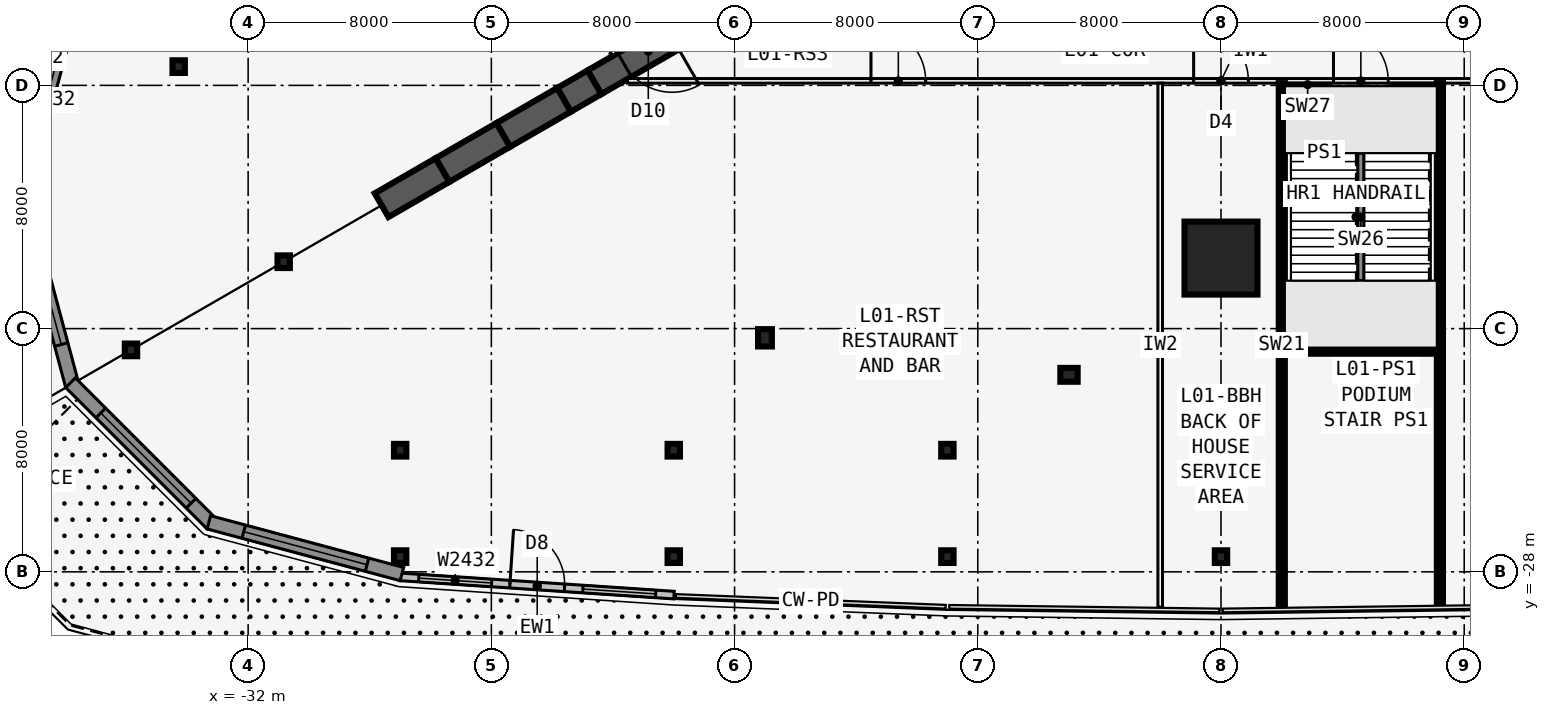
"""IFC4 building model, lengths in metres.
Left out: names, types, materials, properties, quantities, classifications, styles, units other than length and angle.
Written with IfcOpenShell. Run it as: python <this file> out.ifc"""

import sys

from ifc_helpers import new_model, si_unit, direction, frame, frame_2d, origin, origin_2d, place, context, subcontext, project, spatial, rectangle, i_section, extrude, element, fill, save


model = new_model("IFC4")
c1 = context("Model", 3, precision=1e-05, world=origin(), true_north=direction((0.0, 1.0)))
c2 = subcontext(c1, "Body", "Model", "MODEL_VIEW")
j1 = project(units=[si_unit("LENGTHUNIT", "METRE"), si_unit("PLANEANGLEUNIT", "RADIAN")], contexts=[c1])
p1 = place(None, origin())
s1 = spatial("IfcSite", under=j1, at=p1, CompositionType="ELEMENT")
p2 = place(p1, origin())
s2 = spatial("IfcBuilding", under=s1, at=p2, CompositionType="ELEMENT")
p3 = place(p2, frame((0.0, 0.0, 6.0)))
s3 = spatial("IfcBuildingStorey", under=s2, at=p3, CompositionType="ELEMENT", Elevation=6.0)
p4 = place(p3, frame((-16.5, -9.526, 0.0), z_axis=(0.0, 0.0, 1.0), x_axis=(-0.866031398331, -0.499989616998, 0.0)))
e1 = element("IfcWall", 1, at=p4, inside=s3, PredefinedType="SHEAR", context=c2, shape_type="SweptSolid", body=[
    extrude(rectangle(XDim=4.746, YDim=0.9, at=frame_2d((2.373, 0.0))), origin(), (0.0, 0.0, 1.0), 5.0),
])
p5 = place(p4, frame((1.8, 0.0, 0.0)))
e2 = element("IfcOpeningElement", 2, at=p5, cuts=e1, PredefinedType="OPENING", context=c2, shape_type="SweptSolid", body=[
    extrude(rectangle(XDim=1.8, YDim=2.13, at=frame_2d((0.9, 1.065))), frame((0.0, 0.46, 0.0), z_axis=(0.0, -1.0, 0.0), x_axis=(1.0, 0.0, 0.0)), (0.0, 0.0, 1.0), 0.92),
])
p6 = place(p3, frame((-20.61, -11.899, 0.0), z_axis=(0.0, 0.0, 1.0), x_axis=(-0.866009537788, -0.500027479704, 0.0)))
e3 = element("IfcWall", 3, at=p6, inside=s3, PredefinedType="SHEAR", context=c2, shape_type="SweptSolid", body=[
    extrude(rectangle(XDim=1.155, YDim=0.9, at=frame_2d((0.577, 0.0))), origin(), (0.0, 0.0, 1.0), 5.0),
])
for number, where, z_axis, x_axis in (
    (4, (-21.61, -12.477, 0.0), (0.0, 0.0, 1.0), (-0.866, -0.5, 0.0)),
    (5, (-23.61, -13.631, 0.0), (0.0, 0.0, 1.0), (-0.866, -0.5, 0.0)),
    (6, (-25.61, -14.786, 0.0), (0.0, 0.0, 1.0), (-0.866, -0.5, 0.0)),
):
    element("IfcWall", number, at=place(p3, frame(where, z_axis=z_axis, x_axis=x_axis)), inside=s3, PredefinedType="SHEAR", context=c2, shape_type="SweptSolid", body=[
        extrude(rectangle(XDim=2.309, YDim=0.9, at=frame_2d((1.155, 0.0))), origin(), (0.0, 0.0, 1.0), 5.0),
    ])
for number, where, z_axis, x_axis in (
    (7, (-15.0, -20.303, 0.0), (0.0, 0.0, 1.0), (1.0, 0.0, 0.0)),
    (8, (-5.0, -21.521, 0.0), (0.0, 0.0, 1.0), (0.0, -1.0, 0.0)),
    (9, (5.0, -21.521, 0.0), (0.0, 0.0, 1.0), (0.0, -1.0, 0.0)),
):
    element("IfcColumn", number, at=place(p3, frame(where, z_axis=z_axis, x_axis=x_axis)), inside=s3, PredefinedType="COLUMN", context=c2, shape_type="SweptSolid", body=[
        extrude(i_section(OverallWidth=0.455, OverallDepth=0.569, WebThickness=0.078, FlangeThickness=0.125, at=origin_2d()), origin(), (0.0, 0.0, 1.0), 5.0),
    ])
for number, where, z_axis, x_axis in (
    (10, (-30.831, -17.8, 0.0), (0.0, 0.0, 1.0), (1.0, 0.0, 0.0)),
    (11, (-35.854, -20.7, 0.0), (0.0, 0.0, 1.0), (1.0, 0.0, 0.0)),
    (12, (-18.0, -24.0, 0.0), (0.0, 0.0, 1.0), (1.0, 0.0, 0.0)),
    (13, (-27.0, -24.0, 0.0), (0.0, 0.0, 1.0), (1.0, 0.0, 0.0)),
    (14, (-9.0, -24.0, 0.0), (0.0, 0.0, 1.0), (1.0, 0.0, 0.0)),
    (15, (0.0, -24.0, 0.0), (0.0, 0.0, 1.0), (1.0, 0.0, 0.0)),
    (16, (-34.285, -11.383, 0.0), (0.0, 0.0, 1.0), (1.0, 0.0, 0.0)),
    (17, (-18.0, -27.5, 0.0), (0.0, 0.0, 1.0), (1.0, 0.0, 0.0)),
    (18, (-27.0, -27.5, 0.0), (0.0, 0.0, 1.0), (1.0, 0.0, 0.0)),
    (19, (-9.0, -27.5, 0.0), (0.0, 0.0, 1.0), (1.0, 0.0, 0.0)),
    (20, (0.0, -27.5, 0.0), (0.0, 0.0, 1.0), (1.0, 0.0, 0.0)),
):
    element("IfcColumn", number, at=place(p3, frame(where, z_axis=z_axis, x_axis=x_axis)), inside=s3, PredefinedType="COLUMN", context=c2, shape_type="SweptSolid", body=[
        extrude(i_section(OverallWidth=0.406, OverallDepth=0.417, WebThickness=0.03, FlangeThickness=0.048, at=origin_2d()), origin(), (0.0, 0.0, 1.0), 5.0),
    ])
p7 = place(p3, frame((0.0, -17.68, 0.0), z_axis=(0.0, 0.0, 1.0), x_axis=(0.0, -1.0, 0.0)))
e21 = element("IfcColumn", 21, at=p7, inside=s3, PredefinedType="COLUMN", context=c2, shape_type="SweptSolid", body=[
    extrude(rectangle(XDim=2.4, YDim=2.4, at=origin_2d()), origin(), (0.0, 0.0, 1.0), 5.0),
])
p8 = place(p3, frame((-26.992, -28.166, 0.0), z_axis=(0.0, 0.0, 1.0), x_axis=(0.997786235602, -0.066502842363, 0.0)))
e22 = element("IfcWall", 22, at=p8, inside=s3, PredefinedType="STANDARD", context=c2, shape_type="SweptSolid", body=[
    extrude(rectangle(XDim=9.02, YDim=0.25, at=frame_2d((4.51, 0.0))), origin(), (0.0, 0.0, 1.0), 4.75),
])
p9 = place(p8, frame((3.61, 0.0, 0.0)))
e23 = element("IfcOpeningElement", 23, at=p9, cuts=e22, PredefinedType="OPENING", context=c2, shape_type="SweptSolid", body=[
    extrude(rectangle(XDim=1.8, YDim=2.4, at=frame_2d((0.9, 1.2))), frame((0.0, 0.135, 0.0), z_axis=(0.0, -1.0, 0.0), x_axis=(1.0, 0.0, 0.0)), (0.0, 0.0, 1.0), 0.27),
])
p10 = place(p8, frame((0.605, 0.0, 0.6)))
e24 = element("IfcOpeningElement", 24, at=p10, cuts=e22, PredefinedType="OPENING", context=c2, shape_type="SweptSolid", body=[
    extrude(rectangle(XDim=2.4, YDim=3.2, at=frame_2d((1.2, 1.6))), frame((0.0, 0.135, 0.0), z_axis=(0.0, -1.0, 0.0), x_axis=(1.0, 0.0, 0.0)), (0.0, 0.0, 1.0), 0.27),
])
p11 = place(p8, frame((6.015, 0.0, 0.6)))
e25 = element("IfcOpeningElement", 25, at=p11, cuts=e22, PredefinedType="OPENING", context=c2, shape_type="SweptSolid", body=[
    extrude(rectangle(XDim=2.4, YDim=3.2, at=frame_2d((1.2, 1.6))), frame((0.0, 0.135, 0.0), z_axis=(0.0, -1.0, 0.0), x_axis=(1.0, 0.0, 0.0)), (0.0, 0.0, 1.0), 0.27),
])
p12 = place(p3, frame((-37.783, -9.296, 0.0), z_axis=(0.0, 0.0, 1.0), x_axis=(-0.258813420722, -0.96592733332, 0.0)))
e26 = element("IfcWall", 26, at=p12, inside=s3, PredefinedType="SOLIDWALL", context=c2, shape_type="SweptSolid", body=[
    extrude(rectangle(XDim=6.575, YDim=0.45, at=frame_2d((3.288, 0.0))), origin(), (0.0, 0.0, 1.0), 4.75),
])
p13 = place(p12, frame((1.188, 0.0, 0.6)))
e27 = element("IfcOpeningElement", 27, at=p13, cuts=e26, PredefinedType="OPENING", context=c2, shape_type="SweptSolid", body=[
    extrude(rectangle(XDim=4.2, YDim=3.2, at=frame_2d((2.1, 1.6))), frame((0.0, 0.235, 0.0), z_axis=(0.0, -1.0, 0.0), x_axis=(1.0, 0.0, 0.0)), (0.0, 0.0, 1.0), 0.47),
])
p14 = place(p3, frame((-39.484, -15.53, 0.0), z_axis=(0.0, 0.0, 1.0), x_axis=(0.258813420722, -0.96592733332, 0.0)))
e28 = element("IfcWall", 28, at=p14, inside=s3, PredefinedType="SOLIDWALL", context=c2, shape_type="SweptSolid", body=[
    extrude(rectangle(XDim=6.575, YDim=0.45, at=frame_2d((3.288, 0.0))), origin(), (0.0, 0.0, 1.0), 4.75),
])
p15 = place(p14, frame((0.969, 0.0, 0.6)))
e29 = element("IfcOpeningElement", 29, at=p15, cuts=e28, PredefinedType="OPENING", context=c2, shape_type="SweptSolid", body=[
    extrude(rectangle(XDim=4.2, YDim=3.2, at=frame_2d((2.1, 1.6))), frame((0.0, 0.235, 0.0), z_axis=(0.0, -1.0, 0.0), x_axis=(1.0, 0.0, 0.0)), (0.0, 0.0, 1.0), 0.47),
])
p16 = place(p3, frame((-37.841, -21.78, 0.0), z_axis=(0.0, 0.0, 1.0), x_axis=(0.7070882144, -0.707125347486, 0.0)))
e30 = element("IfcWall", 30, at=p16, inside=s3, PredefinedType="SOLIDWALL", context=c2, shape_type="SweptSolid", body=[
    extrude(rectangle(XDim=6.575, YDim=0.45, at=frame_2d((3.287, 0.0))), origin(), (0.0, 0.0, 1.0), 4.75),
])
p17 = place(p16, frame((1.406, 0.0, 0.6)))
e31 = element("IfcOpeningElement", 31, at=p17, cuts=e30, PredefinedType="OPENING", context=c2, shape_type="SweptSolid", body=[
    extrude(rectangle(XDim=4.2, YDim=3.2, at=frame_2d((2.1, 1.6))), frame((0.0, 0.235, 0.0), z_axis=(0.0, -1.0, 0.0), x_axis=(1.0, 0.0, 0.0)), (0.0, 0.0, 1.0), 0.47),
])
p18 = place(p3, frame((-33.293, -26.371, 0.0), z_axis=(0.0, 0.0, 1.0), x_axis=(0.965918049854, -0.258848065411, 0.0)))
e32 = element("IfcWall", 32, at=p18, inside=s3, PredefinedType="SOLIDWALL", context=c2, shape_type="SweptSolid", body=[
    extrude(rectangle(XDim=6.575, YDim=0.45, at=frame_2d((3.288, 0.0))), origin(), (0.0, 0.0, 1.0), 4.75),
])
p19 = place(p18, frame((1.188, 0.0, 0.6)))
e33 = element("IfcOpeningElement", 33, at=p19, cuts=e32, PredefinedType="OPENING", context=c2, shape_type="SweptSolid", body=[
    extrude(rectangle(XDim=4.2, YDim=3.2, at=frame_2d((2.1, 1.6))), frame((0.0, 0.235, 0.0), z_axis=(0.0, -1.0, 0.0), x_axis=(1.0, 0.0, 0.0)), (0.0, 0.0, 1.0), 0.47),
])
p20 = place(p3, frame((-42.859, -11.023, 0.0), z_axis=(0.0, 0.0, 1.0), x_axis=(0.444351186514, 0.895852679319, 0.0)))
e34 = element("IfcWall", 34, at=p20, inside=s3, PredefinedType="PARAPET", context=c2, shape_type="SweptSolid", body=[
    extrude(rectangle(XDim=13.009, YDim=0.3, at=frame_2d((6.504, 0.0))), origin(), (0.0, 0.0, 1.0), 1.1),
])
p21 = place(p3, frame((-19.527, -11.851, 0.0), z_axis=(0.0, 0.0, 1.0), x_axis=(1.0, 0.0, 0.0)))
e35 = element("IfcWall", 35, at=p21, inside=s3, PredefinedType="PARTITIONING", context=c2, shape_type="SweptSolid", body=[
    extrude(rectangle(XDim=39.054, YDim=0.15, at=frame_2d((19.527, 0.0))), origin(), (0.0, 0.0, 1.0), 3.808),
])
p22 = place(p21, frame((8.013, 0.0, 0.0)))
e36 = element("IfcOpeningElement", 36, at=p22, cuts=e35, PredefinedType="OPENING", context=c2, shape_type="SweptSolid", body=[
    extrude(rectangle(XDim=1.8, YDim=2.13, at=frame_2d((0.9, 1.065))), frame((0.0, 0.085, 0.0), z_axis=(0.0, -1.0, 0.0), x_axis=(1.0, 0.0, 0.0)), (0.0, 0.0, 1.0), 0.17),
])
p23 = place(p21, frame((18.627, 0.0, 0.0)))
e37 = element("IfcOpeningElement", 37, at=p23, cuts=e35, PredefinedType="OPENING", context=c2, shape_type="SweptSolid", body=[
    extrude(rectangle(XDim=1.8, YDim=2.13, at=frame_2d((0.9, 1.065))), frame((0.0, 0.085, 0.0), z_axis=(0.0, -1.0, 0.0), x_axis=(1.0, 0.0, 0.0)), (0.0, 0.0, 1.0), 0.17),
])
p24 = place(p21, frame((23.227, 0.0, 0.0)))
e38 = element("IfcOpeningElement", 38, at=p24, cuts=e35, PredefinedType="OPENING", context=c2, shape_type="SweptSolid", body=[
    extrude(rectangle(XDim=1.8, YDim=2.13, at=frame_2d((0.9, 1.065))), frame((0.0, 0.085, 0.0), z_axis=(0.0, -1.0, 0.0), x_axis=(1.0, 0.0, 0.0)), (0.0, 0.0, 1.0), 0.17),
])
p25 = place(p21, frame((31.841, 0.0, 0.0)))
e39 = element("IfcOpeningElement", 39, at=p25, cuts=e35, PredefinedType="OPENING", context=c2, shape_type="SweptSolid", body=[
    extrude(rectangle(XDim=1.8, YDim=2.13, at=frame_2d((0.9, 1.065))), frame((0.0, 0.085, 0.0), z_axis=(0.0, -1.0, 0.0), x_axis=(1.0, 0.0, 0.0)), (0.0, 0.0, 1.0), 0.17),
])
p26 = place(p3, frame((-2.0, -11.926, 0.0), z_axis=(0.0, 0.0, 1.0), x_axis=(0.0, -1.0, 0.0)))
e40 = element("IfcWall", 40, at=p26, inside=s3, PredefinedType="PARTITIONING", context=c2, shape_type="SweptSolid", body=[
    extrude(rectangle(XDim=17.236, YDim=0.15, at=frame_2d((8.618, 0.0))), origin(), (0.0, 0.0, 1.0), 4.75),
])
p27 = place(p3, frame((2.0, -11.926, 0.0), z_axis=(0.0, 0.0, 1.0), x_axis=(0.0, -1.0, 0.0)))
e41 = element("IfcWall", 41, at=p27, inside=s3, PredefinedType="SHEAR", context=c2, shape_type="SweptSolid", body=[
    extrude(rectangle(XDim=17.236, YDim=0.2, at=frame_2d((8.618, 0.0))), origin(), (0.0, 0.0, 1.0), 5.0),
])
p28 = place(p3, frame((7.2, -11.926, 0.0), z_axis=(0.0, 0.0, 1.0), x_axis=(0.0, -1.0, 0.0)))
e42 = element("IfcWall", 42, at=p28, inside=s3, PredefinedType="SHEAR", context=c2, shape_type="SweptSolid", body=[
    extrude(rectangle(XDim=17.167, YDim=0.2, at=frame_2d((8.583, 0.0))), origin(), (0.0, 0.0, 1.0), 5.0),
])
p29 = place(p3, frame((20.027, -10.985, 0.0), z_axis=(0.0, 0.0, 1.0), x_axis=(-0.500001677587, 0.866024435227, 0.0)))
e43 = element("IfcWall", 43, at=p29, inside=s3, PredefinedType="PARTITIONING", context=c2, shape_type="SweptSolid", body=[
    extrude(rectangle(XDim=39.054, YDim=0.15, at=frame_2d((19.527, 0.0))), origin(), (0.0, 0.0, 1.0), 3.808),
])
p30 = place(p29, frame((10.013, 0.0, 0.0)))
e44 = element("IfcOpeningElement", 44, at=p30, cuts=e43, PredefinedType="OPENING", context=c2, shape_type="SweptSolid", body=[
    extrude(rectangle(XDim=1.8, YDim=2.13, at=frame_2d((0.9, 1.065))), frame((0.0, 0.085, 0.0), z_axis=(0.0, -1.0, 0.0), x_axis=(1.0, 0.0, 0.0)), (0.0, 0.0, 1.0), 0.17),
])
p31 = place(p29, frame((23.227, 0.0, 0.0)))
e45 = element("IfcOpeningElement", 45, at=p31, cuts=e43, PredefinedType="OPENING", context=c2, shape_type="SweptSolid", body=[
    extrude(rectangle(XDim=1.8, YDim=2.13, at=frame_2d((0.9, 1.065))), frame((0.0, 0.085, 0.0), z_axis=(0.0, -1.0, 0.0), x_axis=(1.0, 0.0, 0.0)), (0.0, 0.0, 1.0), 0.17),
])
p32 = place(p29, frame((27.627, 0.0, 0.0)))
e46 = element("IfcOpeningElement", 46, at=p32, cuts=e43, PredefinedType="OPENING", context=c2, shape_type="SweptSolid", body=[
    extrude(rectangle(XDim=1.0, YDim=2.13, at=frame_2d((0.5, 1.065))), frame((0.0, 0.085, 0.0), z_axis=(0.0, -1.0, 0.0), x_axis=(1.0, 0.0, 0.0)), (0.0, 0.0, 1.0), 0.17),
])
p33 = place(p29, frame((30.527, 0.0, 0.0)))
e47 = element("IfcOpeningElement", 47, at=p33, cuts=e43, PredefinedType="OPENING", context=c2, shape_type="SweptSolid", body=[
    extrude(rectangle(XDim=1.0, YDim=2.13, at=frame_2d((0.5, 1.065))), frame((0.0, 0.085, 0.0), z_axis=(0.0, -1.0, 0.0), x_axis=(1.0, 0.0, 0.0)), (0.0, 0.0, 1.0), 0.17),
])
p34 = place(p29, frame((33.277, 0.0, 0.0)))
e48 = element("IfcOpeningElement", 48, at=p34, cuts=e43, PredefinedType="OPENING", context=c2, shape_type="SweptSolid", body=[
    extrude(rectangle(XDim=1.0, YDim=2.13, at=frame_2d((0.5, 1.065))), frame((0.0, 0.085, 0.0), z_axis=(0.0, -1.0, 0.0), x_axis=(1.0, 0.0, 0.0)), (0.0, 0.0, 1.0), 0.17),
])
p35 = place(p29, frame((36.39, 0.0, 0.0)))
e49 = element("IfcOpeningElement", 49, at=p35, cuts=e43, PredefinedType="OPENING", context=c2, shape_type="SweptSolid", body=[
    extrude(rectangle(XDim=1.0, YDim=2.13, at=frame_2d((0.5, 1.065))), frame((0.0, 0.085, 0.0), z_axis=(0.0, -1.0, 0.0), x_axis=(1.0, 0.0, 0.0)), (0.0, 0.0, 1.0), 0.17),
])
p36 = place(p3, frame((-0.5, 22.836, 0.0), z_axis=(0.0, 0.0, 1.0), x_axis=(-0.500001677587, -0.866024435227, 0.0)))
e50 = element("IfcWall", 50, at=p36, inside=s3, PredefinedType="PARTITIONING", context=c2, shape_type="SweptSolid", body=[
    extrude(rectangle(XDim=39.054, YDim=0.15, at=frame_2d((19.527, 0.0))), origin(), (0.0, 0.0, 1.0), 3.808),
])
p37 = place(p36, frame((10.013, 0.0, 0.0)))
e51 = element("IfcOpeningElement", 51, at=p37, cuts=e50, PredefinedType="OPENING", context=c2, shape_type="SweptSolid", body=[
    extrude(rectangle(XDim=1.8, YDim=2.13, at=frame_2d((0.9, 1.065))), frame((0.0, 0.085, 0.0), z_axis=(0.0, -1.0, 0.0), x_axis=(1.0, 0.0, 0.0)), (0.0, 0.0, 1.0), 0.17),
])
p38 = place(p36, frame((23.227, 0.0, 0.0)))
e52 = element("IfcOpeningElement", 52, at=p38, cuts=e50, PredefinedType="OPENING", context=c2, shape_type="SweptSolid", body=[
    extrude(rectangle(XDim=1.8, YDim=2.13, at=frame_2d((0.9, 1.065))), frame((0.0, 0.085, 0.0), z_axis=(0.0, -1.0, 0.0), x_axis=(1.0, 0.0, 0.0)), (0.0, 0.0, 1.0), 0.17),
])
p39 = place(p36, frame((27.627, 0.0, 0.0)))
e53 = element("IfcOpeningElement", 53, at=p39, cuts=e50, PredefinedType="OPENING", context=c2, shape_type="SweptSolid", body=[
    extrude(rectangle(XDim=1.0, YDim=2.13, at=frame_2d((0.5, 1.065))), frame((0.0, 0.085, 0.0), z_axis=(0.0, -1.0, 0.0), x_axis=(1.0, 0.0, 0.0)), (0.0, 0.0, 1.0), 0.17),
])
p40 = place(p36, frame((30.277, 0.0, 0.0)))
e54 = element("IfcOpeningElement", 54, at=p40, cuts=e50, PredefinedType="OPENING", context=c2, shape_type="SweptSolid", body=[
    extrude(rectangle(XDim=1.0, YDim=2.13, at=frame_2d((0.5, 1.065))), frame((0.0, 0.085, 0.0), z_axis=(0.0, -1.0, 0.0), x_axis=(1.0, 0.0, 0.0)), (0.0, 0.0, 1.0), 0.17),
])
p41 = place(p36, frame((34.89, 0.0, 0.0)))
e55 = element("IfcOpeningElement", 55, at=p41, cuts=e50, PredefinedType="OPENING", context=c2, shape_type="SweptSolid", body=[
    extrude(rectangle(XDim=1.0, YDim=2.13, at=frame_2d((0.5, 1.065))), frame((0.0, 0.085, 0.0), z_axis=(0.0, -1.0, 0.0), x_axis=(1.0, 0.0, 0.0)), (0.0, 0.0, 1.0), 0.17),
])
p42 = place(p3, frame((2.0, -20.726, 0.0), z_axis=(0.0, 0.0, 1.0), x_axis=(1.0, 0.0, 0.0)))
e56 = element("IfcWall", 56, at=p42, inside=s3, PredefinedType="SHEAR", context=c2, shape_type="SweptSolid", body=[
    extrude(rectangle(XDim=5.2, YDim=0.2, at=frame_2d((2.6, 0.0))), origin(), (0.0, 0.0, 1.0), 5.0),
])
for number, where, z_axis, x_axis in (
    (57, (2.1, -11.976, 0.0), (0.0, 0.0, 1.0), (1.0, 0.0, 0.0)),
    (58, (5.6, -11.976, 0.0), (0.0, 0.0, 1.0), (1.0, 0.0, 0.0)),
):
    element("IfcWall", number, at=place(p3, frame(where, z_axis=z_axis, x_axis=x_axis)), inside=s3, PredefinedType="SOLIDWALL", context=c2, shape_type="SweptSolid", body=[
        extrude(rectangle(XDim=1.5, YDim=0.1, at=frame_2d((0.75, 0.0))), origin(), (0.0, 0.0, 1.0), 5.0),
    ])
p43 = place(p3, frame((4.6, -14.229, 0.0), z_axis=(0.0, 0.0, 1.0), x_axis=(0.0, -1.0, 0.0)))
e59 = element("IfcWall", 59, at=p43, inside=s3, PredefinedType="SOLIDWALL", context=c2, shape_type="SweptSolid", body=[
    extrude(rectangle(XDim=4.194, YDim=0.2, at=frame_2d((2.097, 0.0))), origin(), (0.0, 0.0, 1.0), 5.0),
])
p44 = place(p9, origin())
e60 = element("IfcDoor", 60, at=p44, inside=s3, OperationType="DOUBLE_DOOR_SINGLE_SWING", PredefinedType="DOOR", context=c2, shape_type="SweptSolid", body=[
    extrude(rectangle(XDim=1.8, YDim=2.4, at=frame_2d((0.9, 1.2))), frame((0.0, 0.025, 0.0), z_axis=(0.0, -1.0, 0.0), x_axis=(1.0, 0.0, 0.0)), (0.0, 0.0, 1.0), 0.05),
])
fill(e23, e60)
p45 = place(p10, origin())
e61 = element("IfcWindow", 61, at=p45, inside=s3, PartitioningType="SINGLE_PANEL", PredefinedType="WINDOW", context=c2, shape_type="SweptSolid", body=[
    extrude(rectangle(XDim=2.4, YDim=3.2, at=frame_2d((1.2, 1.6))), frame((0.0, 0.03, 0.0), z_axis=(0.0, -1.0, 0.0), x_axis=(1.0, 0.0, 0.0)), (0.0, 0.0, 1.0), 0.06),
])
fill(e24, e61)
p46 = place(p11, origin())
e62 = element("IfcWindow", 62, at=p46, inside=s3, PartitioningType="SINGLE_PANEL", PredefinedType="WINDOW", context=c2, shape_type="SweptSolid", body=[
    extrude(rectangle(XDim=2.4, YDim=3.2, at=frame_2d((1.2, 1.6))), frame((0.0, 0.03, 0.0), z_axis=(0.0, -1.0, 0.0), x_axis=(1.0, 0.0, 0.0)), (0.0, 0.0, 1.0), 0.06),
])
fill(e25, e62)
p47 = place(p13, origin())
e63 = element("IfcWindow", 63, at=p47, inside=s3, PartitioningType="SINGLE_PANEL", PredefinedType="WINDOW", context=c2, shape_type="SweptSolid", body=[
    extrude(rectangle(XDim=4.2, YDim=3.2, at=frame_2d((2.1, 1.6))), frame((0.0, 0.03, 0.0), z_axis=(0.0, -1.0, 0.0), x_axis=(1.0, 0.0, 0.0)), (0.0, 0.0, 1.0), 0.06),
])
fill(e27, e63)
p48 = place(p15, origin())
e64 = element("IfcWindow", 64, at=p48, inside=s3, PartitioningType="SINGLE_PANEL", PredefinedType="WINDOW", context=c2, shape_type="SweptSolid", body=[
    extrude(rectangle(XDim=4.2, YDim=3.2, at=frame_2d((2.1, 1.6))), frame((0.0, 0.03, 0.0), z_axis=(0.0, -1.0, 0.0), x_axis=(1.0, 0.0, 0.0)), (0.0, 0.0, 1.0), 0.06),
])
fill(e29, e64)
p49 = place(p17, origin())
e65 = element("IfcWindow", 65, at=p49, inside=s3, PartitioningType="SINGLE_PANEL", PredefinedType="WINDOW", context=c2, shape_type="SweptSolid", body=[
    extrude(rectangle(XDim=4.2, YDim=3.2, at=frame_2d((2.1, 1.6))), frame((0.0, 0.03, 0.0), z_axis=(0.0, -1.0, 0.0), x_axis=(1.0, 0.0, 0.0)), (0.0, 0.0, 1.0), 0.06),
])
fill(e31, e65)
p50 = place(p19, origin())
e66 = element("IfcWindow", 66, at=p50, inside=s3, PartitioningType="SINGLE_PANEL", PredefinedType="WINDOW", context=c2, shape_type="SweptSolid", body=[
    extrude(rectangle(XDim=4.2, YDim=3.2, at=frame_2d((2.1, 1.6))), frame((0.0, 0.03, 0.0), z_axis=(0.0, -1.0, 0.0), x_axis=(1.0, 0.0, 0.0)), (0.0, 0.0, 1.0), 0.06),
])
fill(e33, e66)
p51 = place(p22, origin())
e67 = element("IfcDoor", 67, at=p51, inside=s3, OperationType="DOUBLE_DOOR_SINGLE_SWING", PredefinedType="DOOR", context=c2, shape_type="SweptSolid", body=[
    extrude(rectangle(XDim=1.8, YDim=2.13, at=frame_2d((0.9, 1.065))), frame((0.0, 0.025, 0.0), z_axis=(0.0, -1.0, 0.0), x_axis=(1.0, 0.0, 0.0)), (0.0, 0.0, 1.0), 0.05),
])
fill(e36, e67)
p52 = place(p23, origin())
e68 = element("IfcDoor", 68, at=p52, inside=s3, OperationType="DOUBLE_DOOR_SINGLE_SWING", PredefinedType="DOOR", context=c2, shape_type="SweptSolid", body=[
    extrude(rectangle(XDim=1.8, YDim=2.13, at=frame_2d((0.9, 1.065))), frame((0.0, 0.025, 0.0), z_axis=(0.0, -1.0, 0.0), x_axis=(1.0, 0.0, 0.0)), (0.0, 0.0, 1.0), 0.05),
])
fill(e37, e68)
p53 = place(p24, origin())
e69 = element("IfcDoor", 69, at=p53, inside=s3, OperationType="DOUBLE_DOOR_SINGLE_SWING", PredefinedType="DOOR", context=c2, shape_type="SweptSolid", body=[
    extrude(rectangle(XDim=1.8, YDim=2.13, at=frame_2d((0.9, 1.065))), frame((0.0, 0.025, 0.0), z_axis=(0.0, -1.0, 0.0), x_axis=(1.0, 0.0, 0.0)), (0.0, 0.0, 1.0), 0.05),
])
fill(e38, e69)
p54 = place(p5, origin())
e70 = element("IfcDoor", 70, at=p54, inside=s3, OperationType="DOUBLE_DOOR_DOUBLE_SWING", PredefinedType="DOOR", context=c2, shape_type="SweptSolid", body=[
    extrude(rectangle(XDim=1.8, YDim=2.13, at=frame_2d((0.9, 1.065))), frame((0.0, 0.025, 0.0), z_axis=(0.0, -1.0, 0.0), x_axis=(1.0, 0.0, 0.0)), (0.0, 0.0, 1.0), 0.05),
])
fill(e2, e70)
save(model, sys.argv[1])
